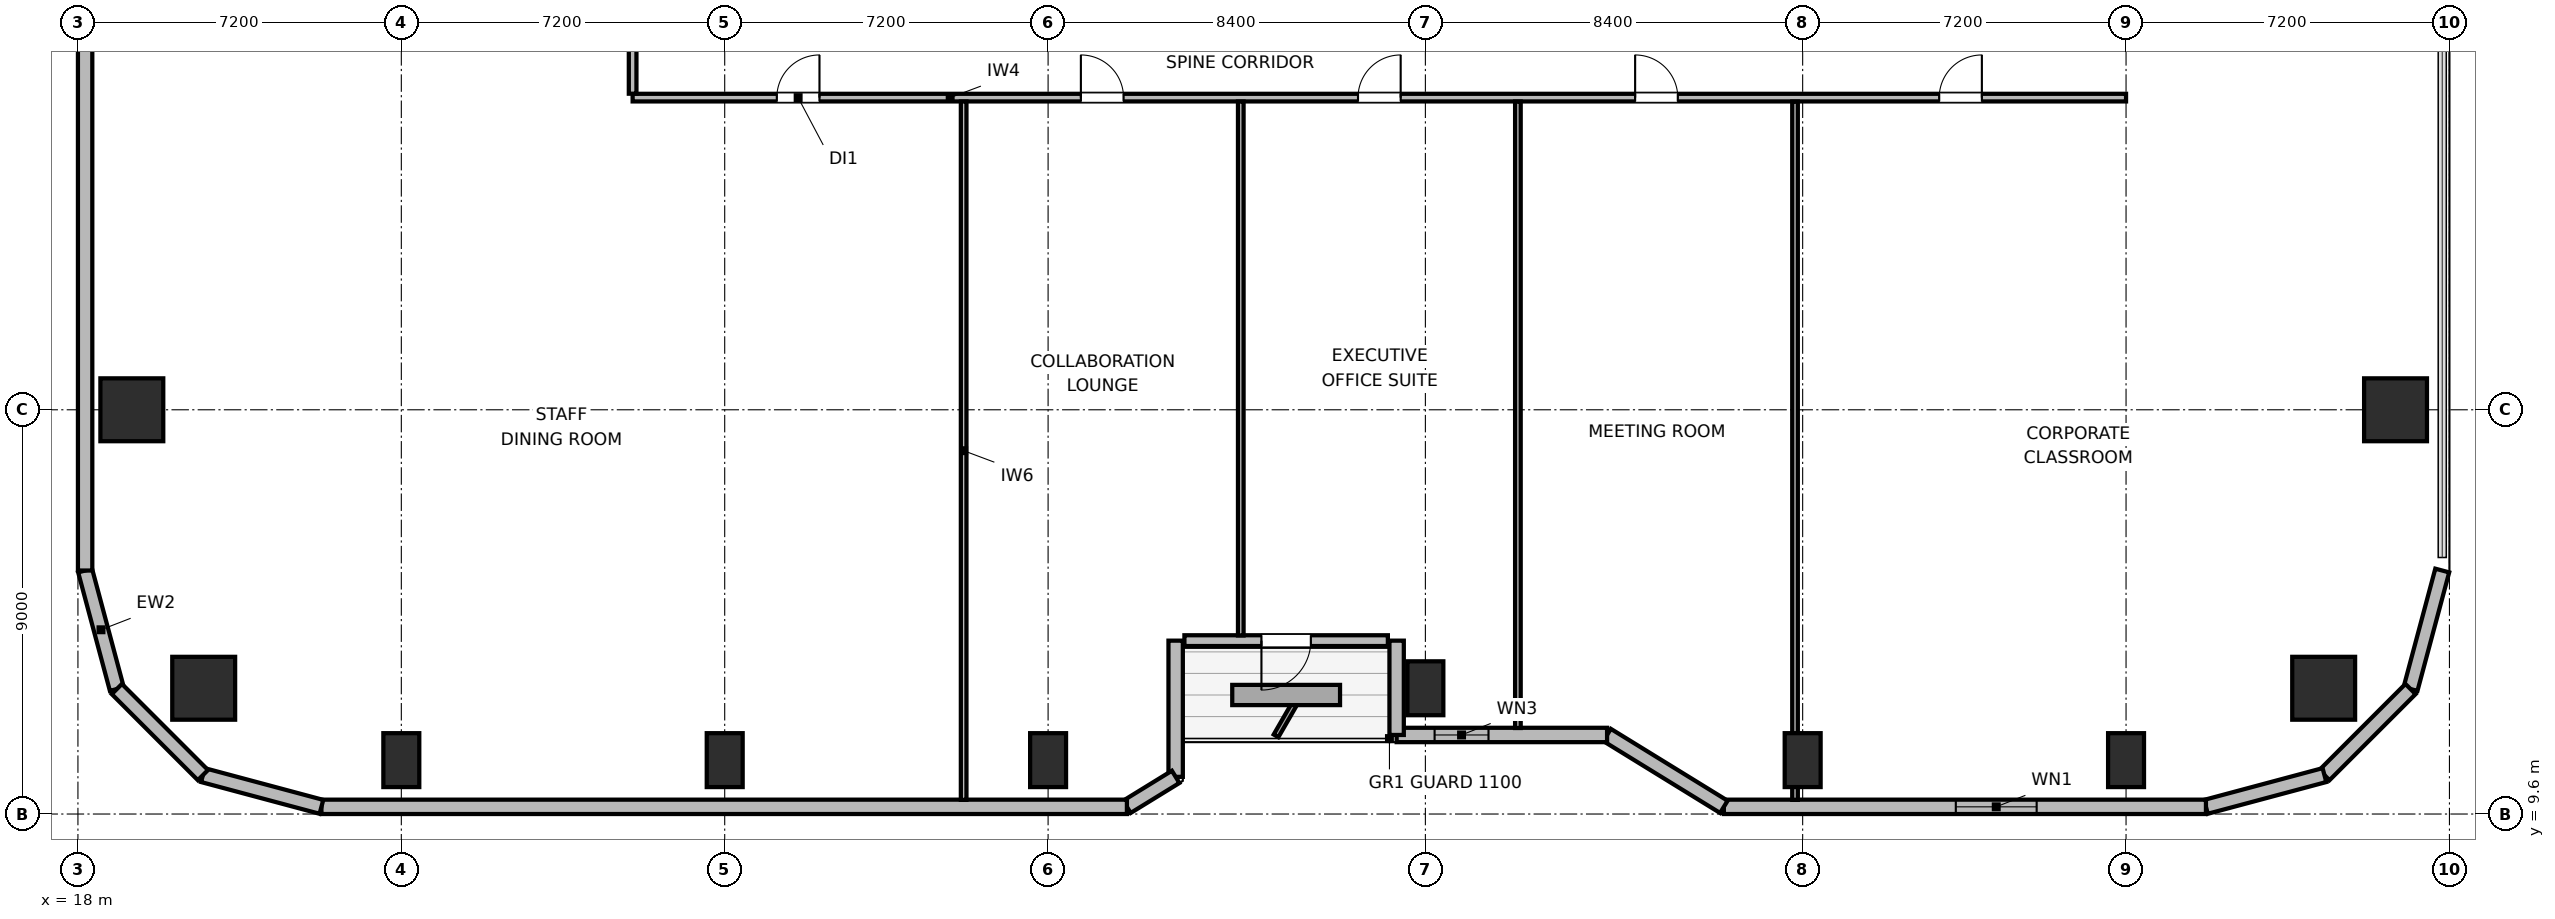
"""IFC4 building model, lengths in metres.
Left out: names, types, materials, properties, quantities, classifications, styles, units other than length and angle.
Written with IfcOpenShell. Run it as: python <this file> out.ifc"""

import sys

from ifc_helpers import new_model, si_unit, direction, frame, frame_2d, origin, origin_2d, place, context, subcontext, project, spatial, rectangle, circle, extrude, element, fill, save


model = new_model("IFC4")
c1 = context("Model", 3, precision=1e-05, world=origin(), true_north=direction((0.0, 1.0)))
c2 = subcontext(c1, "Body", "Model", "MODEL_VIEW")
j1 = project(units=[si_unit("LENGTHUNIT", "METRE"), si_unit("PLANEANGLEUNIT", "RADIAN")], contexts=[c1])
p1 = place(None, origin())
s1 = spatial("IfcSite", under=j1, at=p1, CompositionType="ELEMENT")
p2 = place(p1, origin())
s2 = spatial("IfcBuilding", under=s1, at=p2, CompositionType="ELEMENT")
p3 = place(p2, frame((0.0, 0.0, 133.8)))
s3 = spatial("IfcBuildingStorey", under=s2, at=p3, CompositionType="ELEMENT", Elevation=133.8)
for number, where, z_axis, x_axis in (
    (1, (20.8, 12.4, 0.0), (0.0, 0.0, 1.0), (1.0, 0.0, 0.0)),
    (2, (68.0, 12.4, 0.0), (0.0, 0.0, 1.0), (1.0, 0.0, 0.0)),
):
    element("IfcColumn", number, at=place(p3, frame(where, z_axis=z_axis, x_axis=x_axis)), inside=s3, PredefinedType="COLUMN", context=c2, shape_type="SweptSolid", body=[
        extrude(circle(Radius=0.7, at=origin_2d()), origin(), (0.0, 0.0, 1.0), 3.9),
    ])
for number, where, z_axis, x_axis in (
    (3, (25.2, 10.8, 0.0), (0.0, 0.0, 1.0), (1.0, 0.0, 0.0)),
    (4, (32.4, 10.8, 0.0), (0.0, 0.0, 1.0), (1.0, 0.0, 0.0)),
    (5, (39.6, 10.8, 0.0), (0.0, 0.0, 1.0), (1.0, 0.0, 0.0)),
    (6, (48.0, 12.4, 0.0), (0.0, 0.0, 1.0), (1.0, 0.0, 0.0)),
    (7, (56.4, 10.8, 0.0), (0.0, 0.0, 1.0), (1.0, 0.0, 0.0)),
    (8, (63.6, 10.8, 0.0), (0.0, 0.0, 1.0), (1.0, 0.0, 0.0)),
):
    element("IfcColumn", number, at=place(p3, frame(where, z_axis=z_axis, x_axis=x_axis)), inside=s3, PredefinedType="COLUMN", context=c2, shape_type="SweptSolid", body=[
        extrude(rectangle(XDim=0.8, YDim=1.2, at=origin_2d()), origin(), (0.0, 0.0, 1.0), 3.9),
    ])
for number, where, z_axis, x_axis in (
    (9, (19.2, 18.6, 0.0), (0.0, 0.0, 1.0), (1.0, 0.0, 0.0)),
    (10, (69.6, 18.6, 0.0), (0.0, 0.0, 1.0), (1.0, 0.0, 0.0)),
):
    element("IfcColumn", number, at=place(p3, frame(where, z_axis=z_axis, x_axis=x_axis)), inside=s3, PredefinedType="COLUMN", context=c2, shape_type="SweptSolid", body=[
        extrude(rectangle(XDim=1.4, YDim=1.4, at=origin_2d()), origin(), (0.0, 0.0, 1.0), 3.9),
    ])
p4 = place(p3, frame((18.866, 12.383, 0.0), z_axis=(0.0, 0.0, 1.0), x_axis=(-0.25869736047, 0.965958423373, 0.0)))
e11 = element("IfcWall", 11, at=p4, inside=s3, PredefinedType="SOLIDWALL", context=c2, shape_type="SweptSolid", body=[
    extrude(rectangle(XDim=2.731, YDim=0.32, at=frame_2d((1.366, 0.0))), origin(), (0.0, 0.0, 1.0), 3.64),
])
p5 = place(p3, frame((18.16, 15.021, 0.0), z_axis=(0.0, 0.0, 1.0), x_axis=(0.0, 1.0, 0.0)))
e12 = element("IfcWall", 12, at=p5, inside=s3, PredefinedType="SOLIDWALL", context=c2, shape_type="SweptSolid", body=[
    extrude(rectangle(XDim=14.219, YDim=0.32, at=frame_2d((7.109, 0.0))), origin(), (0.0, 0.0, 1.0), 3.64),
])
p6 = place(p3, frame((70.64, 15.021, 0.0), z_axis=(0.0, 0.0, 1.0), x_axis=(-0.258613949072, -0.965980758269, 0.0)))
e13 = element("IfcWall", 13, at=p6, inside=s3, PredefinedType="SOLIDWALL", context=c2, shape_type="SweptSolid", body=[
    extrude(rectangle(XDim=2.731, YDim=0.32, at=frame_2d((1.366, 0.0))), origin(), (0.0, 0.0, 1.0), 3.64),
])
p7 = place(p3, frame((69.934, 12.383, 0.0), z_axis=(0.0, 0.0, 1.0), x_axis=(-0.707151821269, -0.707061738235, 0.0)))
e14 = element("IfcWall", 14, at=p7, inside=s3, PredefinedType="SOLIDWALL", context=c2, shape_type="SweptSolid", body=[
    extrude(rectangle(XDim=2.71, YDim=0.32, at=frame_2d((1.355, 0.0))), origin(), (0.0, 0.0, 1.0), 3.64),
])
p8 = place(p3, frame((68.017, 10.467, 0.0), z_axis=(0.0, 0.0, 1.0), x_axis=(-0.965958423373, -0.25869736047, 0.0)))
e15 = element("IfcWall", 15, at=p8, inside=s3, PredefinedType="SOLIDWALL", context=c2, shape_type="SweptSolid", body=[
    extrude(rectangle(XDim=2.731, YDim=0.32, at=frame_2d((1.366, 0.0))), origin(), (0.0, 0.0, 1.0), 3.64),
])
p9 = place(p3, frame((65.379, 9.76, 0.0), z_axis=(0.0, 0.0, 1.0), x_axis=(-1.0, 0.0, 0.0)))
e16 = element("IfcWall", 16, at=p9, inside=s3, PredefinedType="SOLIDWALL", context=c2, shape_type="SweptSolid", body=[
    extrude(rectangle(XDim=10.734, YDim=0.32, at=frame_2d((5.367, 0.0))), origin(), (0.0, 0.0, 1.0), 3.64),
])
p10 = place(p9, frame((3.769, 0.0, 0.85)))
e17 = element("IfcOpeningElement", 17, at=p10, cuts=e16, PredefinedType="OPENING", context=c2, shape_type="SweptSolid", body=[
    extrude(rectangle(XDim=1.8, YDim=1.1, at=frame_2d((0.9, 0.55))), frame((0.0, 0.17, 0.0), z_axis=(0.0, -1.0, 0.0), x_axis=(1.0, 0.0, 0.0)), (0.0, 0.0, 1.0), 0.34),
])
p11 = place(p3, frame((54.645, 9.76, 0.0), z_axis=(0.0, 0.0, 1.0), x_axis=(-0.851630857047, 0.524142044989, 0.0)))
e18 = element("IfcWall", 18, at=p11, inside=s3, PredefinedType="SOLIDWALL", context=c2, shape_type="SweptSolid", body=[
    extrude(rectangle(XDim=3.053, YDim=0.32, at=frame_2d((1.526, 0.0))), origin(), (0.0, 0.0, 1.0), 2.875),
])
p12 = place(p3, frame((52.045, 11.36, 0.0), z_axis=(0.0, 0.0, 1.0), x_axis=(-1.0, 0.0, 0.0)))
e19 = element("IfcWall", 19, at=p12, inside=s3, PredefinedType="SOLIDWALL", context=c2, shape_type="SweptSolid", body=[
    extrude(rectangle(XDim=4.685, YDim=0.32, at=frame_2d((2.343, 0.0))), origin(), (0.0, 0.0, 1.0), 2.875),
])
p13 = place(p12, frame((2.64, 0.0, 0.85)))
e20 = element("IfcOpeningElement", 20, at=p13, cuts=e19, PredefinedType="OPENING", context=c2, shape_type="SweptSolid", body=[
    extrude(rectangle(XDim=1.2, YDim=1.1, at=frame_2d((0.6, 0.55))), frame((0.0, 0.17, 0.0), z_axis=(0.0, -1.0, 0.0), x_axis=(1.0, 0.0, 0.0)), (0.0, 0.0, 1.0), 0.34),
])
p14 = place(p3, frame((47.36, 11.36, 0.0), z_axis=(0.0, 0.0, 1.0), x_axis=(0.0, 1.0, 0.0)))
e21 = element("IfcWall", 21, at=p14, inside=s3, PredefinedType="SOLIDWALL", context=c2, shape_type="SweptSolid", body=[
    extrude(rectangle(XDim=2.1, YDim=0.32, at=frame_2d((1.05, 0.0))), origin(), (0.0, 0.0, 1.0), 2.875),
])
p15 = place(p3, frame((47.165, 13.46, 0.0), z_axis=(0.0, 0.0, 1.0), x_axis=(-1.0, 0.0, 0.0)))
e22 = element("IfcWall", 22, at=p15, inside=s3, PredefinedType="SOLIDWALL", context=c2, shape_type="SweptSolid", body=[
    extrude(rectangle(XDim=4.53, YDim=0.24, at=frame_2d((2.265, 0.0))), origin(), (0.0, 0.0, 1.0), 3.64),
])
p16 = place(p15, frame((1.715, 0.0, 0.0)))
e23 = element("IfcOpeningElement", 23, at=p16, cuts=e22, PredefinedType="OPENING", context=c2, shape_type="SweptSolid", body=[
    extrude(rectangle(XDim=1.1, YDim=2.04, at=frame_2d((0.55, 1.02))), frame((0.0, 0.13, 0.0), z_axis=(0.0, -1.0, 0.0), x_axis=(1.0, 0.0, 0.0)), (0.0, 0.0, 1.0), 0.26),
])
p17 = place(p3, frame((42.44, 13.46, 0.0), z_axis=(0.0, 0.0, 1.0), x_axis=(0.0, -1.0, 0.0)))
e24 = element("IfcWall", 24, at=p17, inside=s3, PredefinedType="SOLIDWALL", context=c2, shape_type="SweptSolid", body=[
    extrude(rectangle(XDim=3.032, YDim=0.32, at=frame_2d((1.516, 0.0))), origin(), (0.0, 0.0, 1.0), 2.875),
])
p18 = place(p3, frame((42.44, 10.427, 0.0), z_axis=(0.0, 0.0, 1.0), x_axis=(-0.851776724646, -0.523904964045, 0.0)))
e25 = element("IfcWall", 25, at=p18, inside=s3, PredefinedType="SOLIDWALL", context=c2, shape_type="SweptSolid", body=[
    extrude(rectangle(XDim=1.274, YDim=0.32, at=frame_2d((0.637, 0.0))), origin(), (0.0, 0.0, 1.0), 3.64),
])
p19 = place(p3, frame((41.355, 9.76, 0.0), z_axis=(0.0, 0.0, 1.0), x_axis=(-1.0, 0.0, 0.0)))
e26 = element("IfcWall", 26, at=p19, inside=s3, PredefinedType="SOLIDWALL", context=c2, shape_type="SweptSolid", body=[
    extrude(rectangle(XDim=17.934, YDim=0.32, at=frame_2d((8.967, 0.0))), origin(), (0.0, 0.0, 1.0), 3.64),
])
p20 = place(p3, frame((23.421, 9.76, 0.0), z_axis=(0.0, 0.0, 1.0), x_axis=(-0.965964405026, 0.25867502435, 0.0)))
e27 = element("IfcWall", 27, at=p20, inside=s3, PredefinedType="SOLIDWALL", context=c2, shape_type="SweptSolid", body=[
    extrude(rectangle(XDim=2.731, YDim=0.32, at=frame_2d((1.366, 0.0))), origin(), (0.0, 0.0, 1.0), 3.64),
])
p21 = place(p3, frame((20.783, 10.467, 0.0), z_axis=(0.0, 0.0, 1.0), x_axis=(-0.707106781187, 0.707106781187, 0.0)))
e28 = element("IfcWall", 28, at=p21, inside=s3, PredefinedType="SOLIDWALL", context=c2, shape_type="SweptSolid", body=[
    extrude(rectangle(XDim=2.71, YDim=0.32, at=frame_2d((1.355, 0.0))), origin(), (0.0, 0.0, 1.0), 3.64),
])
p22 = place(p3, frame((30.35, 25.55, 0.0), z_axis=(0.0, 0.0, 1.0), x_axis=(1.0, 0.0, 0.0)))
e29 = element("IfcWall", 29, at=p22, inside=s3, PredefinedType="PARTITIONING", context=c2, shape_type="SweptSolid", body=[
    extrude(rectangle(XDim=33.25, YDim=0.17, at=frame_2d((16.625, 0.0))), origin(), (0.0, 0.0, 1.0), 3.64),
])
p23 = place(p22, frame((3.21, 0.0, 0.0)))
e30 = element("IfcOpeningElement", 30, at=p23, cuts=e29, PredefinedType="OPENING", context=c2, shape_type="SweptSolid", body=[
    extrude(rectangle(XDim=0.95, YDim=2.04, at=frame_2d((0.475, 1.02))), frame((0.0, 0.095, 0.0), z_axis=(0.0, -1.0, 0.0), x_axis=(1.0, 0.0, 0.0)), (0.0, 0.0, 1.0), 0.19),
])
p24 = place(p22, frame((9.98, 0.0, 0.0)))
e31 = element("IfcOpeningElement", 31, at=p24, cuts=e29, PredefinedType="OPENING", context=c2, shape_type="SweptSolid", body=[
    extrude(rectangle(XDim=0.95, YDim=2.04, at=frame_2d((0.475, 1.02))), frame((0.0, 0.095, 0.0), z_axis=(0.0, -1.0, 0.0), x_axis=(1.0, 0.0, 0.0)), (0.0, 0.0, 1.0), 0.19),
])
p25 = place(p22, frame((16.15, 0.0, 0.0)))
e32 = element("IfcOpeningElement", 32, at=p25, cuts=e29, PredefinedType="OPENING", context=c2, shape_type="SweptSolid", body=[
    extrude(rectangle(XDim=0.95, YDim=2.04, at=frame_2d((0.475, 1.02))), frame((0.0, 0.095, 0.0), z_axis=(0.0, -1.0, 0.0), x_axis=(1.0, 0.0, 0.0)), (0.0, 0.0, 1.0), 0.19),
])
p26 = place(p22, frame((22.32, 0.0, 0.0)))
e33 = element("IfcOpeningElement", 33, at=p26, cuts=e29, PredefinedType="OPENING", context=c2, shape_type="SweptSolid", body=[
    extrude(rectangle(XDim=0.95, YDim=2.04, at=frame_2d((0.475, 1.02))), frame((0.0, 0.095, 0.0), z_axis=(0.0, -1.0, 0.0), x_axis=(1.0, 0.0, 0.0)), (0.0, 0.0, 1.0), 0.19),
])
p27 = place(p22, frame((29.09, 0.0, 0.0)))
e34 = element("IfcOpeningElement", 34, at=p27, cuts=e29, PredefinedType="OPENING", context=c2, shape_type="SweptSolid", body=[
    extrude(rectangle(XDim=0.95, YDim=2.04, at=frame_2d((0.475, 1.02))), frame((0.0, 0.095, 0.0), z_axis=(0.0, -1.0, 0.0), x_axis=(1.0, 0.0, 0.0)), (0.0, 0.0, 1.0), 0.19),
])
p28 = place(p3, frame((30.35, 25.637, 0.0), z_axis=(0.0, 0.0, 1.0), x_axis=(0.0, 1.0, 0.0)))
e35 = element("IfcWall", 35, at=p28, inside=s3, PredefinedType="PARTITIONING", context=c2, shape_type="SweptSolid", body=[
    extrude(rectangle(XDim=8.763, YDim=0.17, at=frame_2d((4.381, 0.0))), origin(), (0.0, 0.0, 1.0), 3.64),
])
p29 = place(p28, frame((3.863, 0.0, 0.0)))
e36 = element("IfcOpeningElement", 36, at=p29, cuts=e35, PredefinedType="OPENING", context=c2, shape_type="SweptSolid", body=[
    extrude(rectangle(XDim=0.95, YDim=2.04, at=frame_2d((0.475, 1.02))), frame((0.0, 0.095, 0.0), z_axis=(0.0, -1.0, 0.0), x_axis=(1.0, 0.0, 0.0)), (0.0, 0.0, 1.0), 0.19),
])
p30 = place(p3, frame((37.72, 9.915, 0.0), z_axis=(0.0, 0.0, 1.0), x_axis=(0.0, 1.0, 0.0)))
e37 = element("IfcWall", 37, at=p30, inside=s3, PredefinedType="PARTITIONING", context=c2, shape_type="SweptSolid", body=[
    extrude(rectangle(XDim=15.548, YDim=0.125, at=frame_2d((7.774, 0.0))), origin(), (0.0, 0.0, 1.0), 3.64),
])
p31 = place(p3, frame((43.89, 13.575, 0.0), z_axis=(0.0, 0.0, 1.0), x_axis=(0.0, 1.0, 0.0)))
e38 = element("IfcWall", 38, at=p31, inside=s3, PredefinedType="PARTITIONING", context=c2, shape_type="SweptSolid", body=[
    extrude(rectangle(XDim=11.888, YDim=0.125, at=frame_2d((5.944, 0.0))), origin(), (0.0, 0.0, 1.0), 3.003),
])
p32 = place(p3, frame((50.06, 11.515, 0.0), z_axis=(0.0, 0.0, 1.0), x_axis=(0.0, 1.0, 0.0)))
e39 = element("IfcWall", 39, at=p32, inside=s3, PredefinedType="PARTITIONING", context=c2, shape_type="SweptSolid", body=[
    extrude(rectangle(XDim=13.948, YDim=0.125, at=frame_2d((6.974, 0.0))), origin(), (0.0, 0.0, 1.0), 3.64),
])
p33 = place(p3, frame((56.23, 9.915, 0.0), z_axis=(0.0, 0.0, 1.0), x_axis=(0.0, 1.0, 0.0)))
e40 = element("IfcWall", 40, at=p33, inside=s3, PredefinedType="PARTITIONING", context=c2, shape_type="SweptSolid", body=[
    extrude(rectangle(XDim=15.548, YDim=0.125, at=frame_2d((7.774, 0.0))), origin(), (0.0, 0.0, 1.0), 3.003),
])
p34 = place(p10, origin())
e41 = element("IfcWindow", 41, at=p34, inside=s3, PartitioningType="SINGLE_PANEL", PredefinedType="WINDOW", context=c2, shape_type="SweptSolid", body=[
    extrude(rectangle(XDim=1.8, YDim=1.1, at=frame_2d((0.9, 0.55))), frame((0.0, 0.03, 0.0), z_axis=(0.0, -1.0, 0.0), x_axis=(1.0, 0.0, 0.0)), (0.0, 0.0, 1.0), 0.06),
])
fill(e17, e41)
p35 = place(p13, origin())
e42 = element("IfcWindow", 42, at=p35, inside=s3, PartitioningType="SINGLE_PANEL", PredefinedType="WINDOW", context=c2, shape_type="SweptSolid", body=[
    extrude(rectangle(XDim=1.2, YDim=1.1, at=frame_2d((0.6, 0.55))), frame((0.0, 0.03, 0.0), z_axis=(0.0, -1.0, 0.0), x_axis=(1.0, 0.0, 0.0)), (0.0, 0.0, 1.0), 0.06),
])
fill(e20, e42)
p36 = place(p16, origin())
e43 = element("IfcDoor", 43, at=p36, inside=s3, OperationType="SINGLE_SWING_RIGHT", PredefinedType="DOOR", context=c2, shape_type="SweptSolid", body=[
    extrude(rectangle(XDim=1.1, YDim=2.04, at=frame_2d((0.55, 1.02))), frame((0.0, 0.025, 0.0), z_axis=(0.0, -1.0, 0.0), x_axis=(1.0, 0.0, 0.0)), (0.0, 0.0, 1.0), 0.05),
])
fill(e23, e43)
p37 = place(p23, origin())
e44 = element("IfcDoor", 44, at=p37, inside=s3, OperationType="SINGLE_SWING_RIGHT", PredefinedType="DOOR", context=c2, shape_type="SweptSolid", body=[
    extrude(rectangle(XDim=0.95, YDim=2.04, at=frame_2d((0.475, 1.02))), frame((0.0, 0.025, 0.0), z_axis=(0.0, -1.0, 0.0), x_axis=(1.0, 0.0, 0.0)), (0.0, 0.0, 1.0), 0.05),
])
fill(e30, e44)
p38 = place(p24, origin())
e45 = element("IfcDoor", 45, at=p38, inside=s3, OperationType="SINGLE_SWING_LEFT", PredefinedType="DOOR", context=c2, shape_type="SweptSolid", body=[
    extrude(rectangle(XDim=0.95, YDim=2.04, at=frame_2d((0.475, 1.02))), frame((0.0, 0.025, 0.0), z_axis=(0.0, -1.0, 0.0), x_axis=(1.0, 0.0, 0.0)), (0.0, 0.0, 1.0), 0.05),
])
fill(e31, e45)
p39 = place(p25, origin())
e46 = element("IfcDoor", 46, at=p39, inside=s3, OperationType="SINGLE_SWING_RIGHT", PredefinedType="DOOR", context=c2, shape_type="SweptSolid", body=[
    extrude(rectangle(XDim=0.95, YDim=2.04, at=frame_2d((0.475, 1.02))), frame((0.0, 0.025, 0.0), z_axis=(0.0, -1.0, 0.0), x_axis=(1.0, 0.0, 0.0)), (0.0, 0.0, 1.0), 0.05),
])
fill(e32, e46)
p40 = place(p26, origin())
e47 = element("IfcDoor", 47, at=p40, inside=s3, OperationType="SINGLE_SWING_LEFT", PredefinedType="DOOR", context=c2, shape_type="SweptSolid", body=[
    extrude(rectangle(XDim=0.95, YDim=2.04, at=frame_2d((0.475, 1.02))), frame((0.0, 0.025, 0.0), z_axis=(0.0, -1.0, 0.0), x_axis=(1.0, 0.0, 0.0)), (0.0, 0.0, 1.0), 0.05),
])
fill(e33, e47)
p41 = place(p27, origin())
e48 = element("IfcDoor", 48, at=p41, inside=s3, OperationType="SINGLE_SWING_RIGHT", PredefinedType="DOOR", context=c2, shape_type="SweptSolid", body=[
    extrude(rectangle(XDim=0.95, YDim=2.04, at=frame_2d((0.475, 1.02))), frame((0.0, 0.025, 0.0), z_axis=(0.0, -1.0, 0.0), x_axis=(1.0, 0.0, 0.0)), (0.0, 0.0, 1.0), 0.05),
])
fill(e34, e48)
save(model, sys.argv[1])
